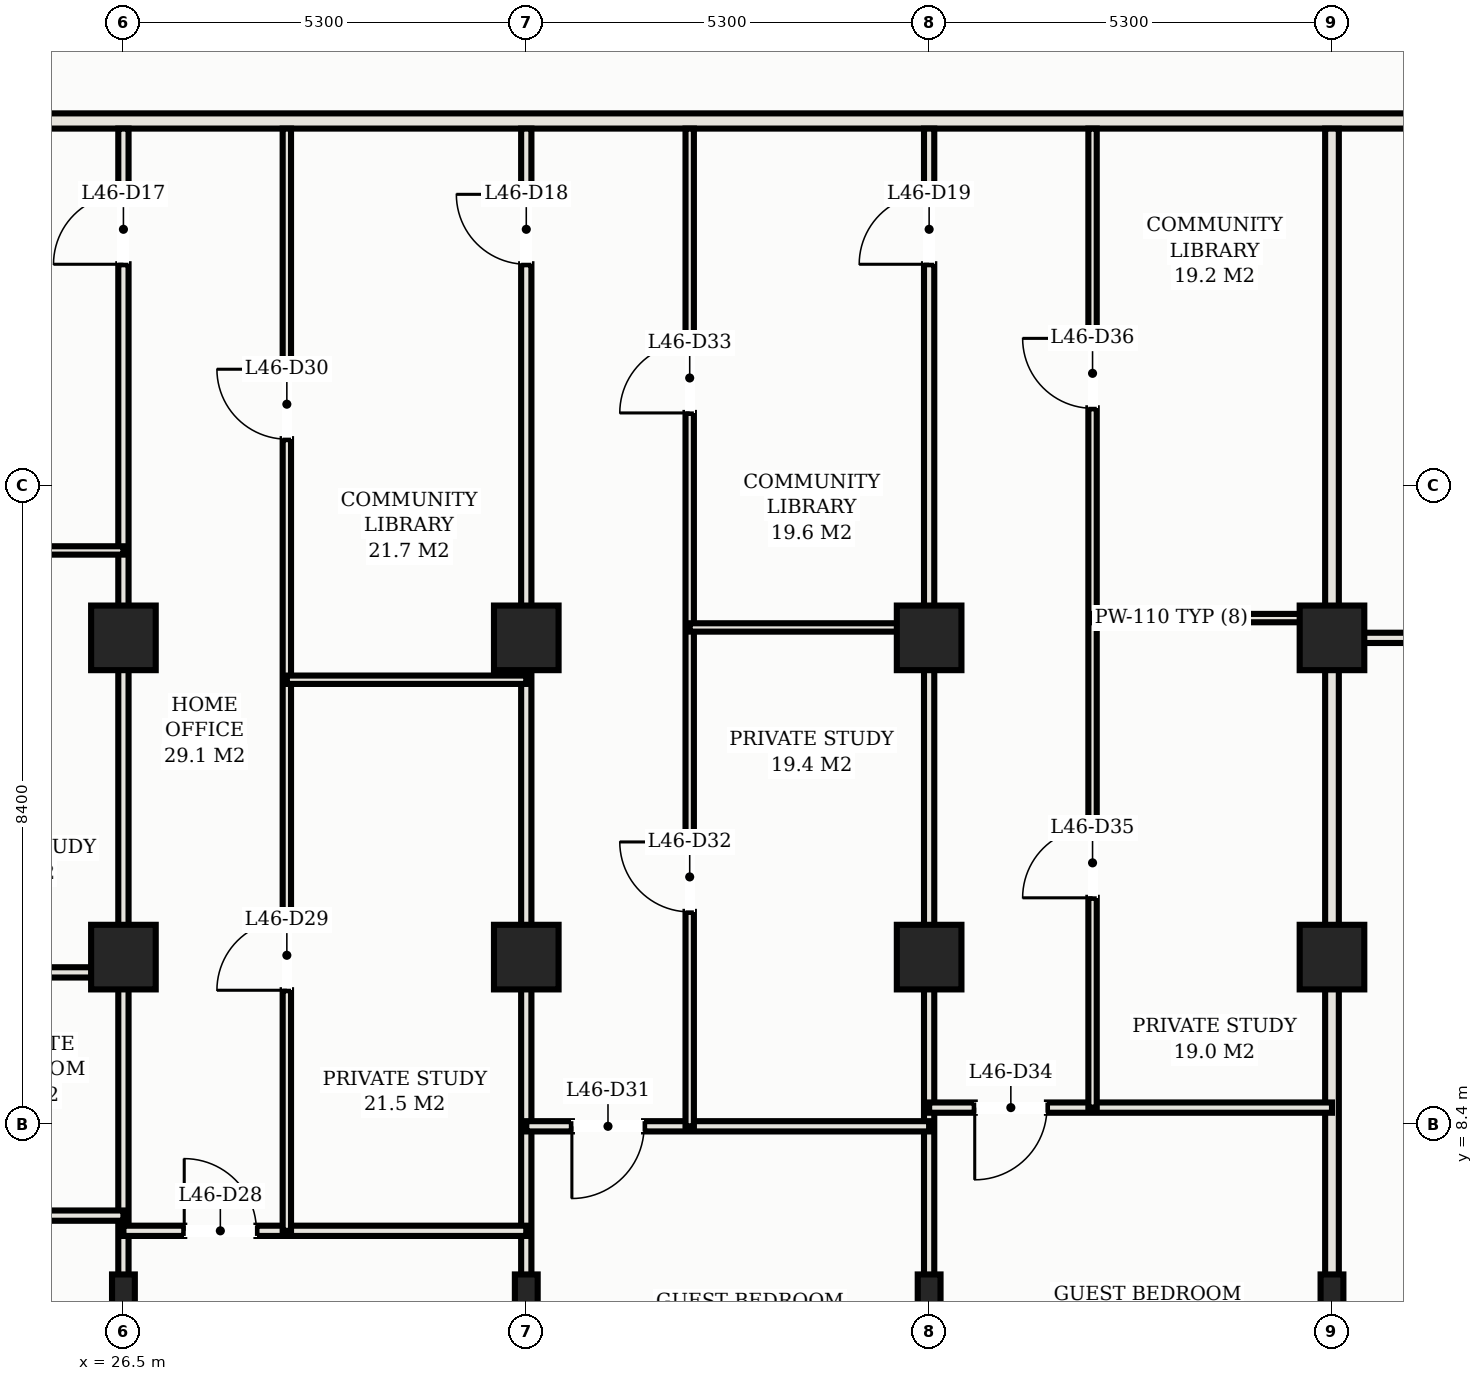
"""IFC4 building model, lengths in metres.
Left out: names, types, materials, properties, quantities, classifications, styles, units other than length and angle.
Written with IfcOpenShell. Run it as: python <this file> out.ifc"""

import sys

from ifc_helpers import new_model, si_unit, direction, frame, frame_2d, origin, origin_2d, place, context, subcontext, project, spatial, rectangle, hollow_rectangle, extrude, element, fill, save


model = new_model("IFC4")
c1 = context("Model", 3, precision=1e-05, world=origin(), true_north=direction((0.0, 1.0)))
c2 = subcontext(c1, "Body", "Model", "MODEL_VIEW")
j1 = project(units=[si_unit("LENGTHUNIT", "METRE"), si_unit("PLANEANGLEUNIT", "RADIAN")], contexts=[c1])
p1 = place(None, origin())
s1 = spatial("IfcSite", under=j1, at=p1, CompositionType="ELEMENT")
p2 = place(p1, origin())
s2 = spatial("IfcBuilding", under=s1, at=p2, CompositionType="ELEMENT")
p3 = place(p2, frame((0.0, 0.0, 168.9)))
s3 = spatial("IfcBuildingStorey", under=s2, at=p3, CompositionType="ELEMENT", Elevation=168.9)
for number, where, z_axis, x_axis in (
    (1, (26.5, 14.8, 0.0), (0.0, 0.0, 1.0), (1.0, 0.0, 0.0)),
    (2, (26.5, 10.6, 0.0), (0.0, 0.0, 1.0), (1.0, 0.0, 0.0)),
    (3, (31.8, 14.8, 0.0), (0.0, 0.0, 1.0), (1.0, 0.0, 0.0)),
    (4, (31.8, 10.6, 0.0), (0.0, 0.0, 1.0), (1.0, 0.0, 0.0)),
    (5, (37.1, 14.8, 0.0), (0.0, 0.0, 1.0), (1.0, 0.0, 0.0)),
    (6, (37.1, 10.6, 0.0), (0.0, 0.0, 1.0), (1.0, 0.0, 0.0)),
    (7, (42.4, 14.8, 0.0), (0.0, 0.0, 1.0), (1.0, 0.0, 0.0)),
    (8, (42.4, 10.6, 0.0), (0.0, 0.0, 1.0), (1.0, 0.0, 0.0)),
):
    element("IfcColumn", number, at=place(p3, frame(where, z_axis=z_axis, x_axis=x_axis)), inside=s3, PredefinedType="COLUMN", context=c2, shape_type="SweptSolid", body=[
        extrude(hollow_rectangle(XDim=0.85, YDim=0.85, WallThickness=0.028, at=origin_2d()), origin(), (0.0, 0.0, 1.0), 3.3),
    ])
for number, where, z_axis, x_axis in (
    (9, (26.5, 6.2, 0.0), (0.0, 0.0, 1.0), (1.0, 0.0, 0.0)),
    (10, (31.8, 6.2, 0.0), (0.0, 0.0, 1.0), (1.0, 0.0, 0.0)),
    (11, (37.1, 6.2, 0.0), (0.0, 0.0, 1.0), (1.0, 0.0, 0.0)),
    (12, (42.4, 6.2, 0.0), (0.0, 0.0, 1.0), (1.0, 0.0, 0.0)),
):
    element("IfcColumn", number, at=place(p3, frame(where, z_axis=z_axis, x_axis=x_axis)), inside=s3, PredefinedType="COLUMN", context=c2, shape_type="SweptSolid", body=[
        extrude(hollow_rectangle(XDim=0.3, YDim=0.45, WallThickness=0.016, at=origin_2d()), origin(), (0.0, 0.0, 1.0), 3.3),
    ])
p4 = place(p3, frame((4.32, 21.6, 0.0), z_axis=(0.0, 0.0, 1.0), x_axis=(1.0, 0.0, 0.0)))
e13 = element("IfcWall", 13, at=p4, inside=s3, PredefinedType="PARTITIONING", context=c2, shape_type="SweptSolid", body=[
    extrude(rectangle(XDim=44.36, YDim=0.2, at=frame_2d((22.18, 0.0))), origin(), (0.0, 0.0, 1.0), 2.38),
])
p5 = place(p4, frame((7.03, 0.0, 0.0)))
e14 = element("IfcOpeningElement", 14, at=p5, cuts=e13, PredefinedType="OPENING", context=c2, shape_type="SweptSolid", body=[
    extrude(rectangle(XDim=1.1, YDim=2.25, at=frame_2d((0.55, 1.125))), frame((0.0, 0.11, 0.0), z_axis=(0.0, -1.0, 0.0), x_axis=(1.0, 0.0, 0.0)), (0.0, 0.0, 1.0), 0.22),
])
p6 = place(p4, frame((2.635, 0.0, 0.0)))
e15 = element("IfcOpeningElement", 15, at=p6, cuts=e13, PredefinedType="OPENING", context=c2, shape_type="SweptSolid", body=[
    extrude(rectangle(XDim=0.92, YDim=2.15, at=frame_2d((0.46, 1.075))), frame((0.0, 0.11, 0.0), z_axis=(0.0, -1.0, 0.0), x_axis=(1.0, 0.0, 0.0)), (0.0, 0.0, 1.0), 0.22),
])
p7 = place(p4, frame((40.805, 0.0, 0.0)))
e16 = element("IfcOpeningElement", 16, at=p7, cuts=e13, PredefinedType="OPENING", context=c2, shape_type="SweptSolid", body=[
    extrude(rectangle(XDim=0.92, YDim=2.15, at=frame_2d((0.46, 1.075))), frame((0.0, 0.11, 0.0), z_axis=(0.0, -1.0, 0.0), x_axis=(1.0, 0.0, 0.0)), (0.0, 0.0, 1.0), 0.22),
])
p8 = place(p3, frame((42.4, 3.62, 0.0), z_axis=(0.0, 0.0, 1.0), x_axis=(0.0, 1.0, 0.0)))
e17 = element("IfcWall", 17, at=p8, inside=s3, PredefinedType="PARTITIONING", context=c2, shape_type="SweptSolid", body=[
    extrude(rectangle(XDim=17.88, YDim=0.18, at=frame_2d((8.94, 0.0))), origin(), (0.0, 0.0, 1.0), 2.38),
])
p9 = place(p3, frame((26.5, 1.82, 0.0), z_axis=(0.0, 0.0, 1.0), x_axis=(0.0, 1.0, 0.0)))
e18 = element("IfcWall", 18, at=p9, inside=s3, PredefinedType="PARTITIONING", context=c2, shape_type="SweptSolid", body=[
    extrude(rectangle(XDim=19.68, YDim=0.135, at=frame_2d((9.84, 0.0))), origin(), (0.0, 0.0, 1.0), 2.38),
])
p10 = place(p9, frame((17.895, 0.0, 0.0)))
e19 = element("IfcOpeningElement", 19, at=p10, cuts=e18, PredefinedType="OPENING", context=c2, shape_type="SweptSolid", body=[
    extrude(rectangle(XDim=0.92, YDim=2.15, at=frame_2d((0.46, 1.075))), frame((0.0, 0.078, 0.0), z_axis=(0.0, -1.0, 0.0), x_axis=(1.0, 0.0, 0.0)), (0.0, 0.0, 1.0), 0.155),
])
p11 = place(p3, frame((31.8, 2.509, 0.0), z_axis=(0.0, 0.0, 1.0), x_axis=(0.0, 1.0, 0.0)))
e20 = element("IfcWall", 20, at=p11, inside=s3, PredefinedType="PARTITIONING", context=c2, shape_type="SweptSolid", body=[
    extrude(rectangle(XDim=18.991, YDim=0.135, at=frame_2d((9.496, 0.0))), origin(), (0.0, 0.0, 1.0), 2.38),
])
p12 = place(p11, frame((17.206, 0.0, 0.0)))
e21 = element("IfcOpeningElement", 21, at=p12, cuts=e20, PredefinedType="OPENING", context=c2, shape_type="SweptSolid", body=[
    extrude(rectangle(XDim=0.92, YDim=2.15, at=frame_2d((0.46, 1.075))), frame((0.0, 0.078, 0.0), z_axis=(0.0, -1.0, 0.0), x_axis=(1.0, 0.0, 0.0)), (0.0, 0.0, 1.0), 0.155),
])
p13 = place(p3, frame((37.1, 3.62, 0.0), z_axis=(0.0, 0.0, 1.0), x_axis=(0.0, 1.0, 0.0)))
e22 = element("IfcWall", 22, at=p13, inside=s3, PredefinedType="PARTITIONING", context=c2, shape_type="SweptSolid", body=[
    extrude(rectangle(XDim=17.88, YDim=0.135, at=frame_2d((8.94, 0.0))), origin(), (0.0, 0.0, 1.0), 2.38),
])
p14 = place(p13, frame((16.095, 0.0, 0.0)))
e23 = element("IfcOpeningElement", 23, at=p14, cuts=e22, PredefinedType="OPENING", context=c2, shape_type="SweptSolid", body=[
    extrude(rectangle(XDim=0.92, YDim=2.15, at=frame_2d((0.46, 1.075))), frame((0.0, 0.078, 0.0), z_axis=(0.0, -1.0, 0.0), x_axis=(1.0, 0.0, 0.0)), (0.0, 0.0, 1.0), 0.155),
])
p15 = place(p3, frame((21.2, 7.199, 0.0), z_axis=(0.0, 0.0, 1.0), x_axis=(1.0, 0.0, 0.0)))
e24 = element("IfcWall", 24, at=p15, inside=s3, PredefinedType="PARTITIONING", context=c2, shape_type="SweptSolid", body=[
    extrude(rectangle(XDim=5.3, YDim=0.135, at=frame_2d((2.65, 0.0))), origin(), (0.0, 0.0, 1.0), 2.38),
])
p16 = place(p15, frame((0.8, 0.0, 0.0)))
e25 = element("IfcOpeningElement", 25, at=p16, cuts=e24, PredefinedType="OPENING", context=c2, shape_type="SweptSolid", body=[
    extrude(rectangle(XDim=0.95, YDim=2.15, at=frame_2d((0.475, 1.075))), frame((0.0, 0.078, 0.0), z_axis=(0.0, -1.0, 0.0), x_axis=(1.0, 0.0, 0.0)), (0.0, 0.0, 1.0), 0.155),
])
p17 = place(p15, frame((3.075, 0.0, 0.0)))
e26 = element("IfcOpeningElement", 26, at=p17, cuts=e24, PredefinedType="OPENING", context=c2, shape_type="SweptSolid", body=[
    extrude(rectangle(XDim=0.9, YDim=2.15, at=frame_2d((0.45, 1.075))), frame((0.0, 0.078, 0.0), z_axis=(0.0, -1.0, 0.0), x_axis=(1.0, 0.0, 0.0)), (0.0, 0.0, 1.0), 0.155),
])
p18 = place(p3, frame((23.35, 10.399, 0.0), z_axis=(0.0, 0.0, 1.0), x_axis=(1.0, 0.0, 0.0)))
e27 = element("IfcWall", 27, at=p18, inside=s3, PredefinedType="PARTITIONING", context=c2, shape_type="SweptSolid", body=[
    extrude(rectangle(XDim=3.15, YDim=0.135, at=frame_2d((1.575, 0.0))), origin(), (0.0, 0.0, 1.0), 2.38),
])
p19 = place(p3, frame((23.35, 15.95, 0.0), z_axis=(0.0, 0.0, 1.0), x_axis=(1.0, 0.0, 0.0)))
e28 = element("IfcWall", 28, at=p19, inside=s3, PredefinedType="MOVABLE", context=c2, shape_type="SweptSolid", body=[
    extrude(rectangle(XDim=3.15, YDim=0.11, at=frame_2d((1.575, 0.0))), origin(), (0.0, 0.0, 1.0), 2.38),
])
p20 = place(p19, frame((0.915, 0.0, 0.0)))
e29 = element("IfcOpeningElement", 29, at=p20, cuts=e28, PredefinedType="OPENING", context=c2, shape_type="SweptSolid", body=[
    extrude(rectangle(XDim=0.92, YDim=2.15, at=frame_2d((0.46, 1.075))), frame((0.0, 0.065, 0.0), z_axis=(0.0, -1.0, 0.0), x_axis=(1.0, 0.0, 0.0)), (0.0, 0.0, 1.0), 0.13),
])
p21 = place(p3, frame((26.5, 6.999, 0.0), z_axis=(0.0, 0.0, 1.0), x_axis=(1.0, 0.0, 0.0)))
e30 = element("IfcWall", 30, at=p21, inside=s3, PredefinedType="PARTITIONING", context=c2, shape_type="SweptSolid", body=[
    extrude(rectangle(XDim=5.3, YDim=0.135, at=frame_2d((2.65, 0.0))), origin(), (0.0, 0.0, 1.0), 2.38),
])
p22 = place(p21, frame((0.8, 0.0, 0.0)))
e31 = element("IfcOpeningElement", 31, at=p22, cuts=e30, PredefinedType="OPENING", context=c2, shape_type="SweptSolid", body=[
    extrude(rectangle(XDim=0.95, YDim=2.15, at=frame_2d((0.475, 1.075))), frame((0.0, 0.078, 0.0), z_axis=(0.0, -1.0, 0.0), x_axis=(1.0, 0.0, 0.0)), (0.0, 0.0, 1.0), 0.155),
])
p23 = place(p3, frame((28.65, 6.999, 0.0), z_axis=(0.0, 0.0, 1.0), x_axis=(0.0, 1.0, 0.0)))
e32 = element("IfcWall", 32, at=p23, inside=s3, PredefinedType="MOVABLE", context=c2, shape_type="SweptSolid", body=[
    extrude(rectangle(XDim=14.501, YDim=0.11, at=frame_2d((7.25, 0.0))), origin(), (0.0, 0.0, 1.0), 2.38),
])
p24 = place(p23, frame((3.165, 0.0, 0.0)))
e33 = element("IfcOpeningElement", 33, at=p24, cuts=e32, PredefinedType="OPENING", context=c2, shape_type="SweptSolid", body=[
    extrude(rectangle(XDim=0.92, YDim=2.15, at=frame_2d((0.46, 1.075))), frame((0.0, 0.065, 0.0), z_axis=(0.0, -1.0, 0.0), x_axis=(1.0, 0.0, 0.0)), (0.0, 0.0, 1.0), 0.13),
])
p25 = place(p23, frame((10.415, 0.0, 0.0)))
e34 = element("IfcOpeningElement", 34, at=p25, cuts=e32, PredefinedType="OPENING", context=c2, shape_type="SweptSolid", body=[
    extrude(rectangle(XDim=0.92, YDim=2.15, at=frame_2d((0.46, 1.075))), frame((0.0, 0.065, 0.0), z_axis=(0.0, -1.0, 0.0), x_axis=(1.0, 0.0, 0.0)), (0.0, 0.0, 1.0), 0.13),
])
p26 = place(p3, frame((28.65, 14.249, 0.0), z_axis=(0.0, 0.0, 1.0), x_axis=(1.0, 0.0, 0.0)))
e35 = element("IfcWall", 35, at=p26, inside=s3, PredefinedType="MOVABLE", context=c2, shape_type="SweptSolid", body=[
    extrude(rectangle(XDim=3.15, YDim=0.11, at=frame_2d((1.575, 0.0))), origin(), (0.0, 0.0, 1.0), 2.38),
])
p27 = place(p3, frame((31.8, 8.374, 0.0), z_axis=(0.0, 0.0, 1.0), x_axis=(1.0, 0.0, 0.0)))
e36 = element("IfcWall", 36, at=p27, inside=s3, PredefinedType="PARTITIONING", context=c2, shape_type="SweptSolid", body=[
    extrude(rectangle(XDim=5.3, YDim=0.135, at=frame_2d((2.65, 0.0))), origin(), (0.0, 0.0, 1.0), 2.38),
])
p28 = place(p27, frame((0.6, 0.0, 0.0)))
e37 = element("IfcOpeningElement", 37, at=p28, cuts=e36, PredefinedType="OPENING", context=c2, shape_type="SweptSolid", body=[
    extrude(rectangle(XDim=0.95, YDim=2.15, at=frame_2d((0.475, 1.075))), frame((0.0, 0.078, 0.0), z_axis=(0.0, -1.0, 0.0), x_axis=(1.0, 0.0, 0.0)), (0.0, 0.0, 1.0), 0.155),
])
p29 = place(p3, frame((33.95, 8.374, 0.0), z_axis=(0.0, 0.0, 1.0), x_axis=(0.0, 1.0, 0.0)))
e38 = element("IfcWall", 38, at=p29, inside=s3, PredefinedType="MOVABLE", context=c2, shape_type="SweptSolid", body=[
    extrude(rectangle(XDim=13.126, YDim=0.11, at=frame_2d((6.563, 0.0))), origin(), (0.0, 0.0, 1.0), 2.38),
])
p30 = place(p29, frame((2.821, 0.0, 0.0)))
e39 = element("IfcOpeningElement", 39, at=p30, cuts=e38, PredefinedType="OPENING", context=c2, shape_type="SweptSolid", body=[
    extrude(rectangle(XDim=0.92, YDim=2.15, at=frame_2d((0.46, 1.075))), frame((0.0, 0.065, 0.0), z_axis=(0.0, -1.0, 0.0), x_axis=(1.0, 0.0, 0.0)), (0.0, 0.0, 1.0), 0.13),
])
p31 = place(p29, frame((9.385, 0.0, 0.0)))
e40 = element("IfcOpeningElement", 40, at=p31, cuts=e38, PredefinedType="OPENING", context=c2, shape_type="SweptSolid", body=[
    extrude(rectangle(XDim=0.92, YDim=2.15, at=frame_2d((0.46, 1.075))), frame((0.0, 0.065, 0.0), z_axis=(0.0, -1.0, 0.0), x_axis=(1.0, 0.0, 0.0)), (0.0, 0.0, 1.0), 0.13),
])
p32 = place(p3, frame((33.95, 14.937, 0.0), z_axis=(0.0, 0.0, 1.0), x_axis=(1.0, 0.0, 0.0)))
e41 = element("IfcWall", 41, at=p32, inside=s3, PredefinedType="MOVABLE", context=c2, shape_type="SweptSolid", body=[
    extrude(rectangle(XDim=3.15, YDim=0.11, at=frame_2d((1.575, 0.0))), origin(), (0.0, 0.0, 1.0), 2.38),
])
p33 = place(p3, frame((37.1, 8.62, 0.0), z_axis=(0.0, 0.0, 1.0), x_axis=(1.0, 0.0, 0.0)))
e42 = element("IfcWall", 42, at=p33, inside=s3, PredefinedType="PARTITIONING", context=c2, shape_type="SweptSolid", body=[
    extrude(rectangle(XDim=5.3, YDim=0.135, at=frame_2d((2.65, 0.0))), origin(), (0.0, 0.0, 1.0), 2.38),
])
p34 = place(p33, frame((0.6, 0.0, 0.0)))
e43 = element("IfcOpeningElement", 43, at=p34, cuts=e42, PredefinedType="OPENING", context=c2, shape_type="SweptSolid", body=[
    extrude(rectangle(XDim=0.95, YDim=2.15, at=frame_2d((0.475, 1.075))), frame((0.0, 0.078, 0.0), z_axis=(0.0, -1.0, 0.0), x_axis=(1.0, 0.0, 0.0)), (0.0, 0.0, 1.0), 0.155),
])
p35 = place(p3, frame((39.25, 8.62, 0.0), z_axis=(0.0, 0.0, 1.0), x_axis=(0.0, 1.0, 0.0)))
e44 = element("IfcWall", 44, at=p35, inside=s3, PredefinedType="MOVABLE", context=c2, shape_type="SweptSolid", body=[
    extrude(rectangle(XDim=12.88, YDim=0.11, at=frame_2d((6.44, 0.0))), origin(), (0.0, 0.0, 1.0), 2.38),
])
p36 = place(p35, frame((2.76, 0.0, 0.0)))
e45 = element("IfcOpeningElement", 45, at=p36, cuts=e44, PredefinedType="OPENING", context=c2, shape_type="SweptSolid", body=[
    extrude(rectangle(XDim=0.92, YDim=2.15, at=frame_2d((0.46, 1.075))), frame((0.0, 0.065, 0.0), z_axis=(0.0, -1.0, 0.0), x_axis=(1.0, 0.0, 0.0)), (0.0, 0.0, 1.0), 0.13),
])
p37 = place(p35, frame((9.2, 0.0, 0.0)))
e46 = element("IfcOpeningElement", 46, at=p37, cuts=e44, PredefinedType="OPENING", context=c2, shape_type="SweptSolid", body=[
    extrude(rectangle(XDim=0.92, YDim=2.15, at=frame_2d((0.46, 1.075))), frame((0.0, 0.065, 0.0), z_axis=(0.0, -1.0, 0.0), x_axis=(1.0, 0.0, 0.0)), (0.0, 0.0, 1.0), 0.13),
])
p38 = place(p3, frame((39.25, 15.06, 0.0), z_axis=(0.0, 0.0, 1.0), x_axis=(1.0, 0.0, 0.0)))
e47 = element("IfcWall", 47, at=p38, inside=s3, PredefinedType="MOVABLE", context=c2, shape_type="SweptSolid", body=[
    extrude(rectangle(XDim=3.15, YDim=0.11, at=frame_2d((1.575, 0.0))), origin(), (0.0, 0.0, 1.0), 2.38),
])
p39 = place(p3, frame((42.4, 14.8, 0.0), z_axis=(0.0, 0.0, 1.0), x_axis=(1.0, 0.0, 0.0)))
e48 = element("IfcWall", 48, at=p39, inside=s3, PredefinedType="PARTITIONING", context=c2, shape_type="SweptSolid", body=[
    extrude(rectangle(XDim=6.18, YDim=0.135, at=frame_2d((3.09, 0.0))), origin(), (0.0, 0.0, 1.0), 2.38),
])
p40 = place(p39, frame((2.63, 0.0, 0.0)))
e49 = element("IfcOpeningElement", 49, at=p40, cuts=e48, PredefinedType="OPENING", context=c2, shape_type="SweptSolid", body=[
    extrude(rectangle(XDim=0.92, YDim=2.15, at=frame_2d((0.46, 1.075))), frame((0.0, 0.078, 0.0), z_axis=(0.0, -1.0, 0.0), x_axis=(1.0, 0.0, 0.0)), (0.0, 0.0, 1.0), 0.155),
])
p41 = place(p10, origin())
e50 = element("IfcDoor", 50, at=p41, inside=s3, OperationType="SINGLE_SWING_LEFT", PredefinedType="DOOR", context=c2, shape_type="SweptSolid", body=[
    extrude(rectangle(XDim=0.92, YDim=2.15, at=frame_2d((0.46, 1.075))), frame((0.0, 0.025, 0.0), z_axis=(0.0, -1.0, 0.0), x_axis=(1.0, 0.0, 0.0)), (0.0, 0.0, 1.0), 0.05),
])
fill(e19, e50)
p42 = place(p12, origin())
e51 = element("IfcDoor", 51, at=p42, inside=s3, OperationType="SINGLE_SWING_RIGHT", PredefinedType="DOOR", context=c2, shape_type="SweptSolid", body=[
    extrude(rectangle(XDim=0.92, YDim=2.15, at=frame_2d((0.46, 1.075))), frame((0.0, 0.025, 0.0), z_axis=(0.0, -1.0, 0.0), x_axis=(1.0, 0.0, 0.0)), (0.0, 0.0, 1.0), 0.05),
])
fill(e21, e51)
p43 = place(p14, origin())
e52 = element("IfcDoor", 52, at=p43, inside=s3, OperationType="SINGLE_SWING_LEFT", PredefinedType="DOOR", context=c2, shape_type="SweptSolid", body=[
    extrude(rectangle(XDim=0.92, YDim=2.15, at=frame_2d((0.46, 1.075))), frame((0.0, 0.025, 0.0), z_axis=(0.0, -1.0, 0.0), x_axis=(1.0, 0.0, 0.0)), (0.0, 0.0, 1.0), 0.05),
])
fill(e23, e52)
p44 = place(p22, origin())
e53 = element("IfcDoor", 53, at=p44, inside=s3, OperationType="SINGLE_SWING_LEFT", PredefinedType="DOOR", context=c2, shape_type="SweptSolid", body=[
    extrude(rectangle(XDim=0.95, YDim=2.15, at=frame_2d((0.475, 1.075))), frame((0.0, 0.025, 0.0), z_axis=(0.0, -1.0, 0.0), x_axis=(1.0, 0.0, 0.0)), (0.0, 0.0, 1.0), 0.05),
])
fill(e31, e53)
p45 = place(p24, origin())
e54 = element("IfcDoor", 54, at=p45, inside=s3, OperationType="SINGLE_SWING_LEFT", PredefinedType="DOOR", context=c2, shape_type="SweptSolid", body=[
    extrude(rectangle(XDim=0.92, YDim=2.15, at=frame_2d((0.46, 1.075))), frame((0.0, 0.025, 0.0), z_axis=(0.0, -1.0, 0.0), x_axis=(1.0, 0.0, 0.0)), (0.0, 0.0, 1.0), 0.05),
])
fill(e33, e54)
p46 = place(p25, origin())
e55 = element("IfcDoor", 55, at=p46, inside=s3, OperationType="SINGLE_SWING_RIGHT", PredefinedType="DOOR", context=c2, shape_type="SweptSolid", body=[
    extrude(rectangle(XDim=0.92, YDim=2.15, at=frame_2d((0.46, 1.075))), frame((0.0, 0.025, 0.0), z_axis=(0.0, -1.0, 0.0), x_axis=(1.0, 0.0, 0.0)), (0.0, 0.0, 1.0), 0.05),
])
fill(e34, e55)
p47 = place(p28, frame((0.95, 0.0, 0.0), z_axis=(0.0, 0.0, 1.0), x_axis=(-1.0, 0.0, 0.0)))
e56 = element("IfcDoor", 56, at=p47, inside=s3, OperationType="SINGLE_SWING_RIGHT", PredefinedType="DOOR", context=c2, shape_type="SweptSolid", body=[
    extrude(rectangle(XDim=0.95, YDim=2.15, at=frame_2d((0.475, 1.075))), frame((0.0, 0.025, 0.0), z_axis=(0.0, -1.0, 0.0), x_axis=(1.0, 0.0, 0.0)), (0.0, 0.0, 1.0), 0.05),
])
fill(e37, e56)
p48 = place(p30, origin())
e57 = element("IfcDoor", 57, at=p48, inside=s3, OperationType="SINGLE_SWING_RIGHT", PredefinedType="DOOR", context=c2, shape_type="SweptSolid", body=[
    extrude(rectangle(XDim=0.92, YDim=2.15, at=frame_2d((0.46, 1.075))), frame((0.0, 0.025, 0.0), z_axis=(0.0, -1.0, 0.0), x_axis=(1.0, 0.0, 0.0)), (0.0, 0.0, 1.0), 0.05),
])
fill(e39, e57)
p49 = place(p31, origin())
e58 = element("IfcDoor", 58, at=p49, inside=s3, OperationType="SINGLE_SWING_LEFT", PredefinedType="DOOR", context=c2, shape_type="SweptSolid", body=[
    extrude(rectangle(XDim=0.92, YDim=2.15, at=frame_2d((0.46, 1.075))), frame((0.0, 0.025, 0.0), z_axis=(0.0, -1.0, 0.0), x_axis=(1.0, 0.0, 0.0)), (0.0, 0.0, 1.0), 0.05),
])
fill(e40, e58)
p50 = place(p34, frame((0.95, 0.0, 0.0), z_axis=(0.0, 0.0, 1.0), x_axis=(-1.0, 0.0, 0.0)))
e59 = element("IfcDoor", 59, at=p50, inside=s3, OperationType="SINGLE_SWING_RIGHT", PredefinedType="DOOR", context=c2, shape_type="SweptSolid", body=[
    extrude(rectangle(XDim=0.95, YDim=2.15, at=frame_2d((0.475, 1.075))), frame((0.0, 0.025, 0.0), z_axis=(0.0, -1.0, 0.0), x_axis=(1.0, 0.0, 0.0)), (0.0, 0.0, 1.0), 0.05),
])
fill(e43, e59)
p51 = place(p36, origin())
e60 = element("IfcDoor", 60, at=p51, inside=s3, OperationType="SINGLE_SWING_LEFT", PredefinedType="DOOR", context=c2, shape_type="SweptSolid", body=[
    extrude(rectangle(XDim=0.92, YDim=2.15, at=frame_2d((0.46, 1.075))), frame((0.0, 0.025, 0.0), z_axis=(0.0, -1.0, 0.0), x_axis=(1.0, 0.0, 0.0)), (0.0, 0.0, 1.0), 0.05),
])
fill(e45, e60)
p52 = place(p37, origin())
e61 = element("IfcDoor", 61, at=p52, inside=s3, OperationType="SINGLE_SWING_RIGHT", PredefinedType="DOOR", context=c2, shape_type="SweptSolid", body=[
    extrude(rectangle(XDim=0.92, YDim=2.15, at=frame_2d((0.46, 1.075))), frame((0.0, 0.025, 0.0), z_axis=(0.0, -1.0, 0.0), x_axis=(1.0, 0.0, 0.0)), (0.0, 0.0, 1.0), 0.05),
])
fill(e46, e61)
save(model, sys.argv[1])
